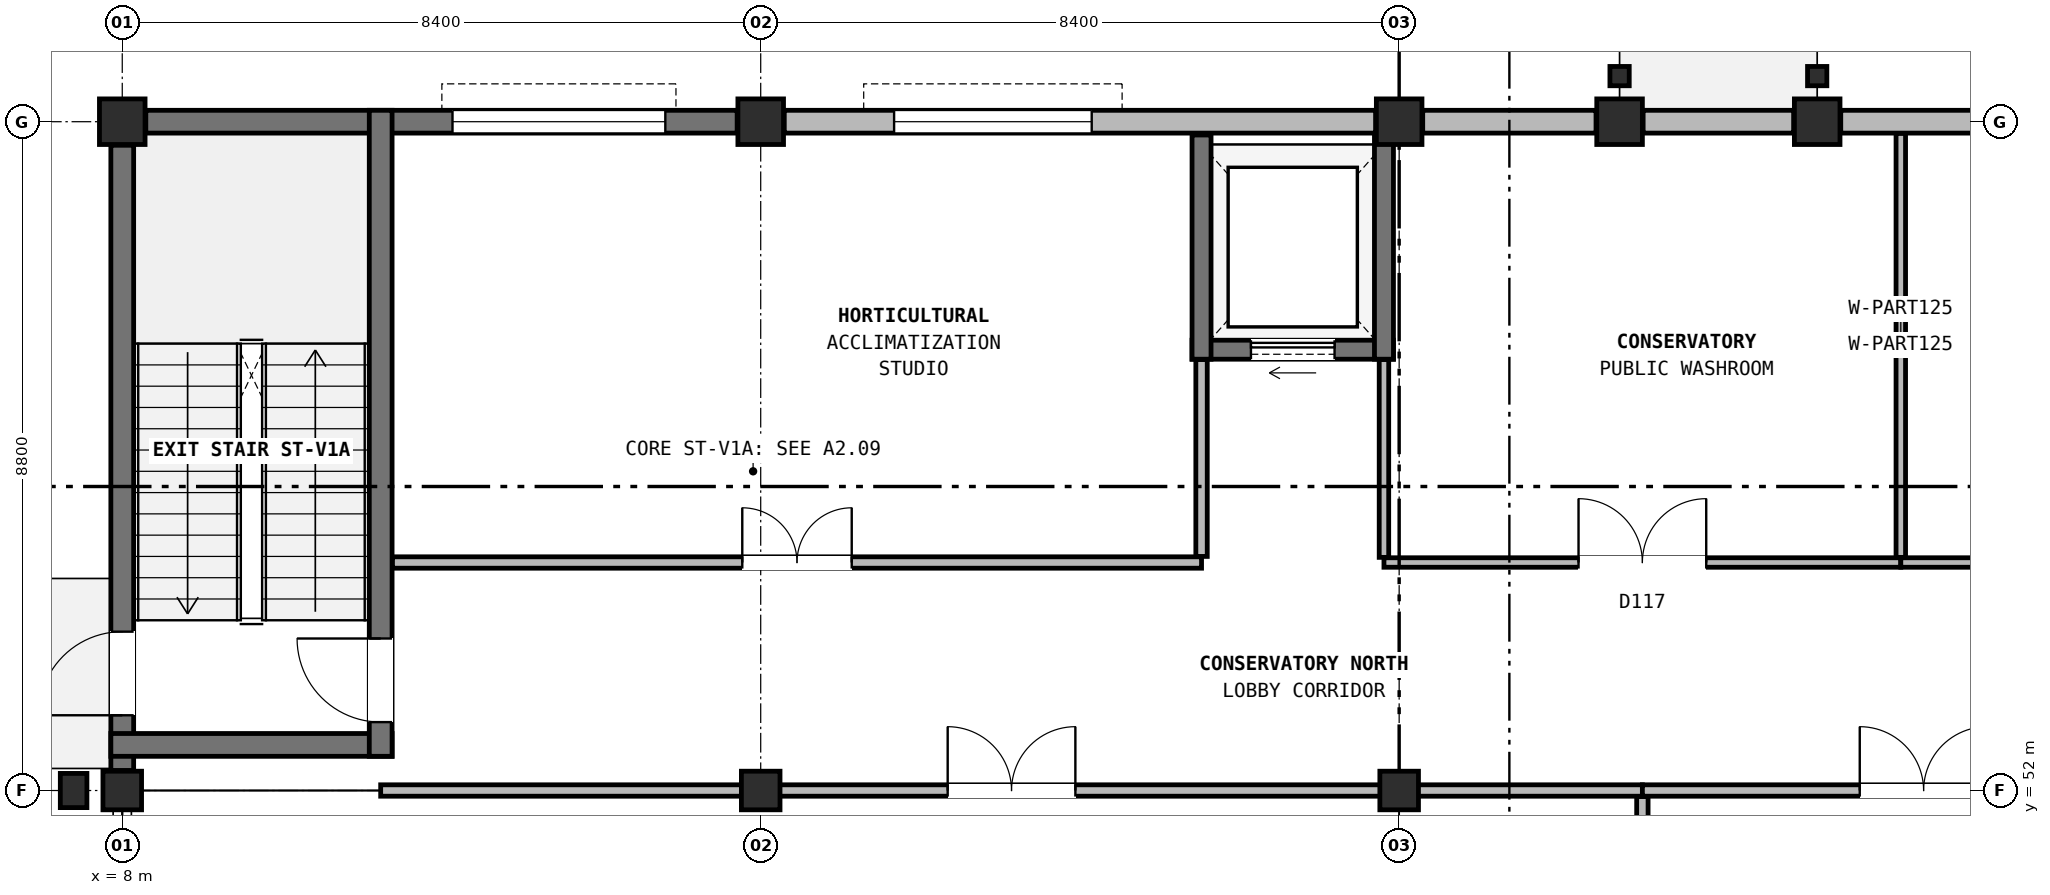
"""IFC4 building model, lengths in metres.
Left out: names, types, materials, properties, quantities, classifications, styles, units other than length and angle.
Written with IfcOpenShell. Run it as: python <this file> out.ifc"""

import sys

from ifc_helpers import new_model, si_unit, direction, frame, frame_2d, origin, origin_2d, place, context, subcontext, project, spatial, rectangle, hollow_rectangle, hollow_circle, extrude, element, fill, save


model = new_model("IFC4")
c1 = context("Model", 3, precision=1e-05, world=origin(), true_north=direction((0.0, 1.0)))
c2 = subcontext(c1, "Body", "Model", "MODEL_VIEW")
j1 = project(units=[si_unit("LENGTHUNIT", "METRE"), si_unit("PLANEANGLEUNIT", "RADIAN")], contexts=[c1])
p1 = place(None, origin())
s1 = spatial("IfcSite", under=j1, at=p1, CompositionType="ELEMENT")
p2 = place(p1, origin())
s2 = spatial("IfcBuilding", under=s1, at=p2, CompositionType="ELEMENT")
p3 = place(p2, origin())
s3 = spatial("IfcBuildingStorey", under=s2, at=p3, CompositionType="ELEMENT", Elevation=0.0)
p4 = place(p3, frame((8.0, 52.0, 0.0), z_axis=(0.0, 0.0, 1.0), x_axis=(1.0, 0.0, 0.0)))
e1 = element("IfcColumn", 1, at=p4, inside=s3, PredefinedType="COLUMN", context=c2, shape_type="SweptSolid", body=[
    extrude(hollow_circle(Radius=0.254, WallThickness=0.016, at=origin_2d()), origin(), (0.0, 0.0, 1.0), 4.8),
])
p5 = place(p3, frame((7.36, 52.0, 0.0), z_axis=(0.0, 0.0, 1.0), x_axis=(1.0, 0.0, 0.0)))
e2 = element("IfcColumn", 2, at=p5, inside=s3, PredefinedType="PILASTER", context=c2, shape_type="SweptSolid", body=[
    extrude(rectangle(XDim=0.35, YDim=0.45, at=origin_2d()), origin(), (0.0, 0.0, 1.0), 4.8),
])
for number, where, z_axis, x_axis in (
    (3, (16.4, 52.0, 0.0), (0.0, 0.0, 1.0), (1.0, 0.0, 0.0)),
    (4, (24.8, 52.0, 0.0), (0.0, 0.0, 1.0), (1.0, 0.0, 0.0)),
):
    element("IfcColumn", number, at=place(p3, frame(where, z_axis=z_axis, x_axis=x_axis)), inside=s3, PredefinedType="COLUMN", context=c2, shape_type="SweptSolid", body=[
        extrude(hollow_circle(Radius=0.254, WallThickness=0.016, at=origin_2d()), origin(), (0.0, 0.0, 1.0), 4.8),
    ])
for number, where, z_axis, x_axis in (
    (5, (8.0, 60.8, 0.0), (0.0, 0.0, 1.0), (1.0, 0.0, 0.0)),
    (6, (16.4, 60.8, 0.0), (0.0, 0.0, 1.0), (1.0, 0.0, 0.0)),
    (7, (24.8, 60.8, 0.0), (0.0, 0.0, 1.0), (1.0, 0.0, 0.0)),
):
    element("IfcColumn", number, at=place(p3, frame(where, z_axis=z_axis, x_axis=x_axis)), inside=s3, PredefinedType="COLUMN", context=c2, shape_type="SweptSolid", body=[
        extrude(rectangle(XDim=0.6, YDim=0.6, at=origin_2d()), origin(), (0.0, 0.0, 1.0), 4.8),
    ])
for number, where, z_axis, x_axis in (
    (8, (27.7, 61.4, 0.0), (0.0, 0.0, 1.0), (1.0, 0.0, 0.0)),
    (9, (30.3, 61.4, 0.0), (0.0, 0.0, 1.0), (1.0, 0.0, 0.0)),
):
    element("IfcColumn", number, at=place(p3, frame(where, z_axis=z_axis, x_axis=x_axis)), inside=s3, PredefinedType="COLUMN", context=c2, shape_type="SweptSolid", body=[
        extrude(hollow_rectangle(XDim=0.254, YDim=0.254, WallThickness=0.013, InnerFilletRadius=0.013, OuterFilletRadius=0.025, at=origin_2d()), origin(), (0.0, 0.0, 1.0), 4.8),
    ])
for number, where, z_axis, x_axis in (
    (10, (27.7, 60.8, 0.0), (0.0, 0.0, 1.0), (1.0, 0.0, 0.0)),
    (11, (30.3, 60.8, 0.0), (0.0, 0.0, 1.0), (1.0, 0.0, 0.0)),
):
    element("IfcColumn", number, at=place(p3, frame(where, z_axis=z_axis, x_axis=x_axis)), inside=s3, PredefinedType="COLUMN", context=c2, shape_type="SweptSolid", body=[
        extrude(rectangle(XDim=0.6, YDim=0.6, at=origin_2d()), origin(), (0.0, 0.0, 1.0), 4.8),
    ])
p6 = place(p3, frame((32.89, 60.8, 0.0), z_axis=(0.0, 0.0, 1.0), x_axis=(-1.0, 0.0, 0.0)))
e12 = element("IfcWall", 12, at=p6, inside=s3, PredefinedType="SOLIDWALL", context=c2, shape_type="SweptSolid", body=[
    extrude(rectangle(XDim=2.28, YDim=0.3, at=frame_2d((1.14, 0.0))), origin(), (0.0, 0.0, 1.0), 4.15),
])
p7 = place(p3, frame((29.99, 60.8, 0.0), z_axis=(0.0, 0.0, 1.0), x_axis=(-1.0, 0.0, 0.0)))
e13 = element("IfcWall", 13, at=p7, inside=s3, PredefinedType="SOLIDWALL", context=c2, shape_type="SweptSolid", body=[
    extrude(rectangle(XDim=1.98, YDim=0.3, at=frame_2d((0.99, 0.0))), origin(), (0.0, 0.0, 1.0), 4.15),
])
p8 = place(p3, frame((27.39, 60.8, 0.0), z_axis=(0.0, 0.0, 1.0), x_axis=(-1.0, 0.0, 0.0)))
e14 = element("IfcWall", 14, at=p8, inside=s3, PredefinedType="SOLIDWALL", context=c2, shape_type="SweptSolid", body=[
    extrude(rectangle(XDim=2.28, YDim=0.3, at=frame_2d((1.14, 0.0))), origin(), (0.0, 0.0, 1.0), 4.15),
])
p9 = place(p3, frame((24.49, 60.8, 0.0), z_axis=(0.0, 0.0, 1.0), x_axis=(-1.0, 0.0, 0.0)))
e15 = element("IfcWall", 15, at=p9, inside=s3, PredefinedType="SOLIDWALL", context=c2, shape_type="SweptSolid", body=[
    extrude(rectangle(XDim=7.78, YDim=0.3, at=frame_2d((3.89, 0.0))), origin(), (0.0, 0.0, 1.0), 4.15),
])
p10 = place(p9, frame((3.735, 0.0, 0.9)))
e16 = element("IfcOpeningElement", 16, at=p10, cuts=e15, PredefinedType="OPENING", context=c2, shape_type="SweptSolid", body=[
    extrude(rectangle(XDim=2.6, YDim=2.0, at=frame_2d((1.3, 1.0))), frame((0.0, 0.16, 0.0), z_axis=(0.0, -1.0, 0.0), x_axis=(1.0, 0.0, 0.0)), (0.0, 0.0, 1.0), 0.32),
])
p11 = place(p3, frame((16.09, 60.8, 0.0), z_axis=(0.0, 0.0, 1.0), x_axis=(-1.0, 0.0, 0.0)))
e17 = element("IfcWall", 17, at=p11, inside=s3, PredefinedType="SHEAR", context=c2, shape_type="SweptSolid", body=[
    extrude(rectangle(XDim=7.78, YDim=0.3, at=frame_2d((3.89, 0.0))), origin(), (0.0, 0.0, 1.0), 4.15),
])
p12 = place(p11, frame((0.945, 0.0, 0.9)))
e18 = element("IfcOpeningElement", 18, at=p12, cuts=e17, PredefinedType="OPENING", context=c2, shape_type="SweptSolid", body=[
    extrude(rectangle(XDim=2.8, YDim=2.05, at=frame_2d((1.4, 1.025))), frame((0.0, 0.16, 0.0), z_axis=(0.0, -1.0, 0.0), x_axis=(1.0, 0.0, 0.0)), (0.0, 0.0, 1.0), 0.32),
])
p13 = place(p3, frame((8.0, 60.49, 0.0), z_axis=(0.0, 0.0, 1.0), x_axis=(0.0, -1.0, 0.0)))
e19 = element("IfcWall", 19, at=p13, inside=s3, PredefinedType="SHEAR", context=c2, shape_type="SweptSolid", body=[
    extrude(rectangle(XDim=8.226, YDim=0.3, at=frame_2d((4.113, 0.0))), origin(), (0.0, 0.0, 1.0), 4.15),
])
p14 = place(p13, frame((6.4, 0.0, 0.0)))
e20 = element("IfcOpeningElement", 20, at=p14, cuts=e19, PredefinedType="OPENING", context=c2, shape_type="SweptSolid", body=[
    extrude(rectangle(XDim=1.1, YDim=2.2, at=frame_2d((0.55, 1.1))), frame((0.0, 0.16, 0.0), z_axis=(0.0, -1.0, 0.0), x_axis=(1.0, 0.0, 0.0)), (0.0, 0.0, 1.0), 0.32),
])
p15 = place(p3, frame((7.85, 52.6, 0.0), z_axis=(0.0, 0.0, 1.0), x_axis=(1.0, 0.0, 0.0)))
e21 = element("IfcWall", 21, at=p15, inside=s3, PredefinedType="SHEAR", context=c2, shape_type="SweptSolid", body=[
    extrude(rectangle(XDim=3.7, YDim=0.3, at=frame_2d((1.85, 0.0))), origin(), (0.0, 0.0, 1.0), 4.8),
])
p16 = place(p3, frame((11.4, 52.45, 0.0), z_axis=(0.0, 0.0, 1.0), x_axis=(0.0, 1.0, 0.0)))
e22 = element("IfcWall", 22, at=p16, inside=s3, PredefinedType="SHEAR", context=c2, shape_type="SweptSolid", body=[
    extrude(rectangle(XDim=8.5, YDim=0.3, at=frame_2d((4.25, 0.0))), origin(), (0.0, 0.0, 1.0), 4.8),
])
p17 = place(p16, frame((0.45, 0.0, 0.0)))
e23 = element("IfcOpeningElement", 23, at=p17, cuts=e22, PredefinedType="OPENING", context=c2, shape_type="SweptSolid", body=[
    extrude(rectangle(XDim=1.1, YDim=2.2, at=frame_2d((0.55, 1.1))), frame((0.0, 0.16, 0.0), z_axis=(0.0, -1.0, 0.0), x_axis=(1.0, 0.0, 0.0)), (0.0, 0.0, 1.0), 0.32),
])
p18 = place(p3, frame((22.075, 57.8, 0.0), z_axis=(0.0, 0.0, 1.0), x_axis=(1.0, 0.0, 0.0)))
e24 = element("IfcWall", 24, at=p18, inside=s3, PredefinedType="SOLIDWALL", context=c2, shape_type="SweptSolid", body=[
    extrude(rectangle(XDim=2.65, YDim=0.25, at=frame_2d((1.325, 0.0))), origin(), (0.0, 0.0, 1.0), 4.48),
])
p19 = place(p18, frame((0.775, 0.0, 0.0)))
e25 = element("IfcOpeningElement", 25, at=p19, cuts=e24, PredefinedType="OPENING", context=c2, shape_type="SweptSolid", body=[
    extrude(rectangle(XDim=1.1, YDim=2.2, at=frame_2d((0.55, 1.1))), frame((0.0, 0.135, 0.0), z_axis=(0.0, -1.0, 0.0), x_axis=(1.0, 0.0, 0.0)), (0.0, 0.0, 1.0), 0.27),
])
for number, where, z_axis, x_axis in (
    (26, (22.2, 57.675, 0.0), (0.0, 0.0, 1.0), (0.0, 1.0, 0.0)),
    (27, (24.6, 57.675, 0.0), (0.0, 0.0, 1.0), (0.0, 1.0, 0.0)),
):
    element("IfcWall", number, at=place(p3, frame(where, z_axis=z_axis, x_axis=x_axis)), inside=s3, PredefinedType="SOLIDWALL", context=c2, shape_type="SweptSolid", body=[
        extrude(rectangle(XDim=2.95, YDim=0.25, at=frame_2d((1.475, 0.0))), origin(), (0.0, 0.0, 1.0), 4.48),
    ])
p20 = place(p3, frame((11.4, 52.0, 0.0), z_axis=(0.0, 0.0, 1.0), x_axis=(1.0, 0.0, 0.0)))
e28 = element("IfcWall", 28, at=p20, inside=s3, PredefinedType="PARTITIONING", context=c2, shape_type="SweptSolid", body=[
    extrude(rectangle(XDim=16.6, YDim=0.15, at=frame_2d((8.3, 0.0))), origin(), (0.0, 0.0, 1.0), 4.145),
])
p21 = place(p20, frame((7.46, 0.0, 0.0)))
e29 = element("IfcOpeningElement", 29, at=p21, cuts=e28, PredefinedType="OPENING", context=c2, shape_type="SweptSolid", body=[
    extrude(rectangle(XDim=1.68, YDim=2.3, at=frame_2d((0.84, 1.15))), frame((0.0, 0.085, 0.0), z_axis=(0.0, -1.0, 0.0), x_axis=(1.0, 0.0, 0.0)), (0.0, 0.0, 1.0), 0.17),
])
p22 = place(p3, frame((28.0, 52.0, 0.0), z_axis=(0.0, 0.0, 1.0), x_axis=(1.0, 0.0, 0.0)))
e30 = element("IfcWall", 30, at=p22, inside=s3, PredefinedType="PARTITIONING", context=c2, shape_type="SweptSolid", body=[
    extrude(rectangle(XDim=10.2, YDim=0.15, at=frame_2d((5.1, 0.0))), origin(), (0.0, 0.0, 1.0), 4.145),
])
p23 = place(p22, frame((2.86, 0.0, 0.0)))
e31 = element("IfcOpeningElement", 31, at=p23, cuts=e30, PredefinedType="OPENING", context=c2, shape_type="SweptSolid", body=[
    extrude(rectangle(XDim=1.68, YDim=2.3, at=frame_2d((0.84, 1.15))), frame((0.0, 0.085, 0.0), z_axis=(0.0, -1.0, 0.0), x_axis=(1.0, 0.0, 0.0)), (0.0, 0.0, 1.0), 0.17),
])
p24 = place(p3, frame((11.555, 55.0, 0.0), z_axis=(0.0, 0.0, 1.0), x_axis=(1.0, 0.0, 0.0)))
e32 = element("IfcWall", 32, at=p24, inside=s3, PredefinedType="PARTITIONING", context=c2, shape_type="SweptSolid", body=[
    extrude(rectangle(XDim=10.645, YDim=0.15, at=frame_2d((5.323, 0.0))), origin(), (0.0, 0.0, 1.0), 4.465),
])
p25 = place(p24, frame((4.603, 0.0, 0.0)))
e33 = element("IfcOpeningElement", 33, at=p25, cuts=e32, PredefinedType="OPENING", context=c2, shape_type="SweptSolid", body=[
    extrude(rectangle(XDim=1.44, YDim=2.26, at=frame_2d((0.72, 1.13))), frame((0.0, 0.085, 0.0), z_axis=(0.0, -1.0, 0.0), x_axis=(1.0, 0.0, 0.0)), (0.0, 0.0, 1.0), 0.17),
])
p26 = place(p3, frame((24.6, 55.0, 0.0), z_axis=(0.0, 0.0, 1.0), x_axis=(1.0, 0.0, 0.0)))
e34 = element("IfcWall", 34, at=p26, inside=s3, PredefinedType="PARTITIONING", context=c2, shape_type="SweptSolid", body=[
    extrude(rectangle(XDim=6.8, YDim=0.125, at=frame_2d((3.4, 0.0))), origin(), (0.0, 0.0, 1.0), 4.465),
])
p27 = place(p26, frame((2.56, 0.0, 0.0)))
e35 = element("IfcOpeningElement", 35, at=p27, cuts=e34, PredefinedType="OPENING", context=c2, shape_type="SweptSolid", body=[
    extrude(rectangle(XDim=1.68, YDim=2.3, at=frame_2d((0.84, 1.15))), frame((0.0, 0.073, 0.0), z_axis=(0.0, -1.0, 0.0), x_axis=(1.0, 0.0, 0.0)), (0.0, 0.0, 1.0), 0.145),
])
p28 = place(p3, frame((31.4, 55.0, 0.0), z_axis=(0.0, 0.0, 1.0), x_axis=(1.0, 0.0, 0.0)))
e36 = element("IfcWall", 36, at=p28, inside=s3, PredefinedType="PARTITIONING", context=c2, shape_type="SweptSolid", body=[
    extrude(rectangle(XDim=6.645, YDim=0.125, at=frame_2d((3.323, 0.0))), origin(), (0.0, 0.0, 1.0), 4.465),
])
p29 = place(p28, frame((2.482, 0.0, 0.0)))
e37 = element("IfcOpeningElement", 37, at=p29, cuts=e36, PredefinedType="OPENING", context=c2, shape_type="SweptSolid", body=[
    extrude(rectangle(XDim=1.68, YDim=2.3, at=frame_2d((0.84, 1.15))), frame((0.0, 0.073, 0.0), z_axis=(0.0, -1.0, 0.0), x_axis=(1.0, 0.0, 0.0)), (0.0, 0.0, 1.0), 0.145),
])
p30 = place(p3, frame((22.2, 55.08, 0.0), z_axis=(0.0, 0.0, 1.0), x_axis=(0.0, 1.0, 0.0)))
e38 = element("IfcWall", 38, at=p30, inside=s3, PredefinedType="PARTITIONING", context=c2, shape_type="SweptSolid", body=[
    extrude(rectangle(XDim=2.59, YDim=0.15, at=frame_2d((1.295, 0.0))), origin(), (0.0, 0.0, 1.0), 4.465),
])
p31 = place(p3, frame((24.6, 55.067, 0.0), z_axis=(0.0, 0.0, 1.0), x_axis=(0.0, 1.0, 0.0)))
e39 = element("IfcWall", 39, at=p31, inside=s3, PredefinedType="PARTITIONING", context=c2, shape_type="SweptSolid", body=[
    extrude(rectangle(XDim=2.603, YDim=0.125, at=frame_2d((1.301, 0.0))), origin(), (0.0, 0.0, 1.0), 4.145),
])
p32 = place(p3, frame((28.0, 16.955, 0.0), z_axis=(0.0, 0.0, 1.0), x_axis=(0.0, 1.0, 0.0)))
e40 = element("IfcWall", 40, at=p32, inside=s3, PredefinedType="PARTITIONING", context=c2, shape_type="SweptSolid", body=[
    extrude(rectangle(XDim=34.965, YDim=0.15, at=frame_2d((17.482, 0.0))), origin(), (0.0, 0.0, 1.0), 4.465),
])
p33 = place(p3, frame((31.4, 55.067, 0.0), z_axis=(0.0, 0.0, 1.0), x_axis=(0.0, 1.0, 0.0)))
e41 = element("IfcWall", 41, at=p33, inside=s3, PredefinedType="PARTITIONING", context=c2, shape_type="SweptSolid", body=[
    extrude(rectangle(XDim=5.578, YDim=0.125, at=frame_2d((2.789, 0.0))), origin(), (0.0, 0.0, 1.0), 4.465),
])
p34 = place(p10, origin())
e42 = element("IfcWindow", 42, at=p34, inside=s3, PartitioningType="SINGLE_PANEL", PredefinedType="WINDOW", context=c2, shape_type="SweptSolid", body=[
    extrude(rectangle(XDim=2.6, YDim=2.0, at=frame_2d((1.3, 1.0))), frame((0.0, 0.03, 0.0), z_axis=(0.0, -1.0, 0.0), x_axis=(1.0, 0.0, 0.0)), (0.0, 0.0, 1.0), 0.06),
])
fill(e16, e42)
p35 = place(p12, origin())
e43 = element("IfcWindow", 43, at=p35, inside=s3, PartitioningType="SINGLE_PANEL", PredefinedType="WINDOW", context=c2, shape_type="SweptSolid", body=[
    extrude(rectangle(XDim=2.8, YDim=2.05, at=frame_2d((1.4, 1.025))), frame((0.0, 0.03, 0.0), z_axis=(0.0, -1.0, 0.0), x_axis=(1.0, 0.0, 0.0)), (0.0, 0.0, 1.0), 0.06),
])
fill(e18, e43)
p36 = place(p14, frame((1.1, 0.0, 0.0), z_axis=(0.0, 0.0, 1.0), x_axis=(-1.0, 0.0, 0.0)))
e44 = element("IfcDoor", 44, at=p36, inside=s3, OperationType="SINGLE_SWING_RIGHT", PredefinedType="DOOR", context=c2, shape_type="SweptSolid", body=[
    extrude(rectangle(XDim=1.1, YDim=2.2, at=frame_2d((0.55, 1.1))), frame((0.0, 0.025, 0.0), z_axis=(0.0, -1.0, 0.0), x_axis=(1.0, 0.0, 0.0)), (0.0, 0.0, 1.0), 0.05),
])
fill(e20, e44)
p37 = place(p17, origin())
e45 = element("IfcDoor", 45, at=p37, inside=s3, OperationType="SINGLE_SWING_RIGHT", PredefinedType="DOOR", context=c2, shape_type="SweptSolid", body=[
    extrude(rectangle(XDim=1.1, YDim=2.2, at=frame_2d((0.55, 1.1))), frame((0.0, 0.025, 0.0), z_axis=(0.0, -1.0, 0.0), x_axis=(1.0, 0.0, 0.0)), (0.0, 0.0, 1.0), 0.05),
])
fill(e23, e45)
p38 = place(p19, origin())
e46 = element("IfcDoor", 46, at=p38, inside=s3, OperationType="SLIDING_TO_LEFT", PredefinedType="DOOR", context=c2, shape_type="SweptSolid", body=[
    extrude(rectangle(XDim=1.1, YDim=2.2, at=frame_2d((0.55, 1.1))), frame((0.0, 0.025, 0.0), z_axis=(0.0, -1.0, 0.0), x_axis=(1.0, 0.0, 0.0)), (0.0, 0.0, 1.0), 0.05),
])
fill(e25, e46)
p39 = place(p21, origin())
e47 = element("IfcDoor", 47, at=p39, inside=s3, OperationType="DOUBLE_DOOR_SINGLE_SWING", PredefinedType="DOOR", context=c2, shape_type="SweptSolid", body=[
    extrude(rectangle(XDim=1.68, YDim=2.3, at=frame_2d((0.84, 1.15))), frame((0.0, 0.025, 0.0), z_axis=(0.0, -1.0, 0.0), x_axis=(1.0, 0.0, 0.0)), (0.0, 0.0, 1.0), 0.05),
])
fill(e29, e47)
p40 = place(p23, origin())
e48 = element("IfcDoor", 48, at=p40, inside=s3, OperationType="DOUBLE_DOOR_SINGLE_SWING", PredefinedType="DOOR", context=c2, shape_type="SweptSolid", body=[
    extrude(rectangle(XDim=1.68, YDim=2.3, at=frame_2d((0.84, 1.15))), frame((0.0, 0.025, 0.0), z_axis=(0.0, -1.0, 0.0), x_axis=(1.0, 0.0, 0.0)), (0.0, 0.0, 1.0), 0.05),
])
fill(e31, e48)
p41 = place(p25, origin())
e49 = element("IfcDoor", 49, at=p41, inside=s3, OperationType="DOUBLE_DOOR_SINGLE_SWING", PredefinedType="DOOR", context=c2, shape_type="SweptSolid", body=[
    extrude(rectangle(XDim=1.44, YDim=2.26, at=frame_2d((0.72, 1.13))), frame((0.0, 0.025, 0.0), z_axis=(0.0, -1.0, 0.0), x_axis=(1.0, 0.0, 0.0)), (0.0, 0.0, 1.0), 0.05),
])
fill(e33, e49)
p42 = place(p27, origin())
e50 = element("IfcDoor", 50, at=p42, inside=s3, OperationType="DOUBLE_DOOR_SINGLE_SWING", PredefinedType="DOOR", context=c2, shape_type="SweptSolid", body=[
    extrude(rectangle(XDim=1.68, YDim=2.3, at=frame_2d((0.84, 1.15))), frame((0.0, 0.025, 0.0), z_axis=(0.0, -1.0, 0.0), x_axis=(1.0, 0.0, 0.0)), (0.0, 0.0, 1.0), 0.05),
])
fill(e35, e50)
save(model, sys.argv[1])
